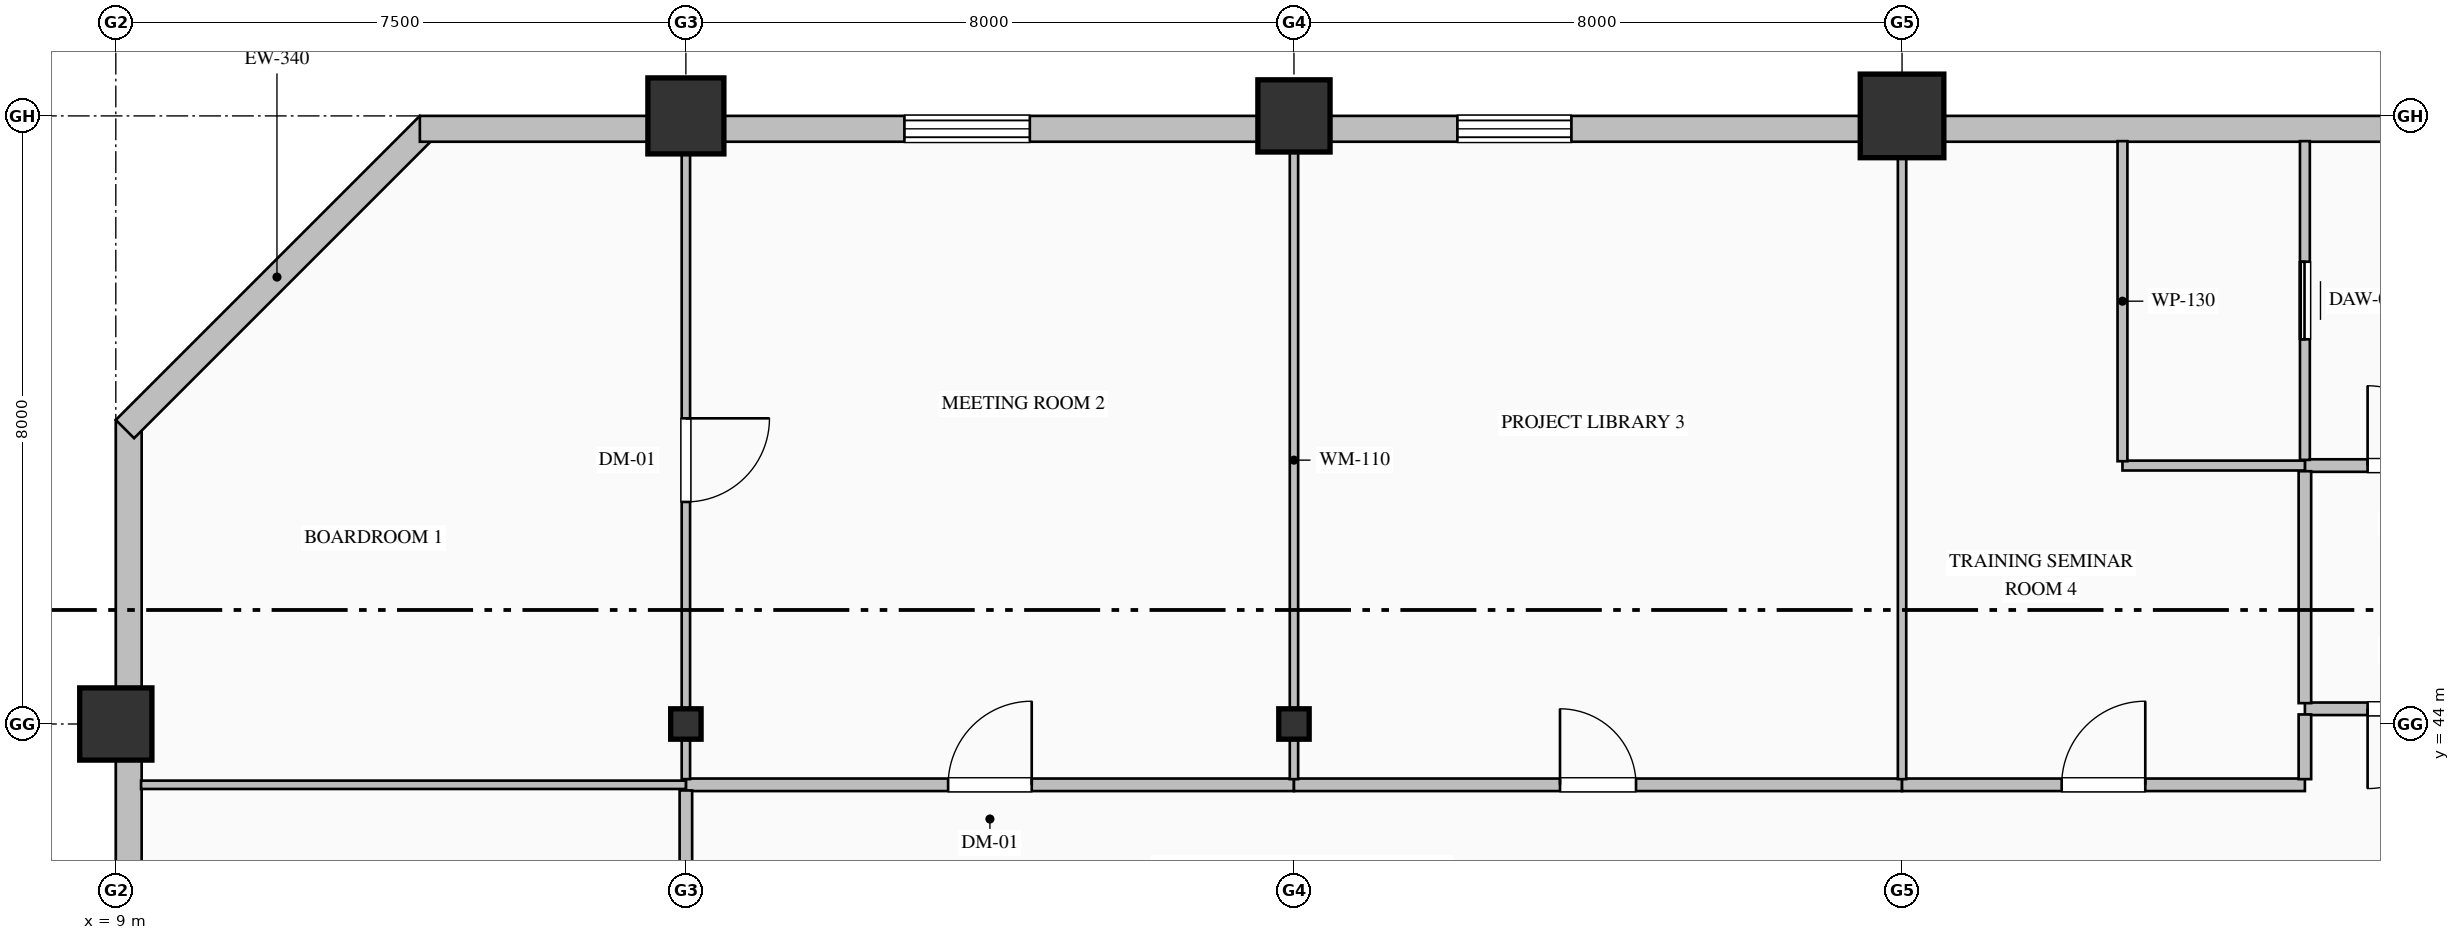
"""IFC4 building model, lengths in metres.
Left out: names, types, materials, properties, quantities, classifications, styles, units other than length and angle.
Written with IfcOpenShell. Run it as: python <this file> out.ifc"""

import sys

from ifc_helpers import new_model, si_unit, direction, frame, frame_2d, origin, origin_2d, place, context, subcontext, project, spatial, rectangle, hollow_rectangle, hollow_circle, i_section, extrude, element, fill, save


model = new_model("IFC4")
c1 = context("Model", 3, precision=1e-05, world=origin(), true_north=direction((0.0, 1.0)))
c2 = subcontext(c1, "Body", "Model", "MODEL_VIEW")
j1 = project(units=[si_unit("LENGTHUNIT", "METRE"), si_unit("PLANEANGLEUNIT", "RADIAN")], contexts=[c1])
p1 = place(None, origin())
s1 = spatial("IfcSite", under=j1, at=p1, CompositionType="ELEMENT")
p2 = place(p1, origin())
s2 = spatial("IfcBuilding", under=s1, at=p2, CompositionType="ELEMENT")
p3 = place(p2, frame((0.0, 0.0, 131.0)))
s3 = spatial("IfcBuildingStorey", under=s2, at=p3, CompositionType="ELEMENT", Elevation=131.0)
p4 = place(p3, frame((9.0, 44.0, 0.0), z_axis=(0.0, 0.0, 1.0), x_axis=(1.0, 0.0, 0.0)))
e1 = element("IfcColumn", 1, at=p4, inside=s3, PredefinedType="COLUMN", context=c2, shape_type="SweptSolid", body=[
    extrude(hollow_rectangle(XDim=0.95, YDim=0.95, WallThickness=0.036, at=origin_2d()), origin(), (0.0, 0.0, 1.0), 4.0),
])
p5 = place(p3, frame((16.5, 44.0, 0.0), z_axis=(0.0, 0.0, 1.0), x_axis=(1.0, 0.0, 0.0)))
e2 = element("IfcColumn", 2, at=p5, inside=s3, PredefinedType="COLUMN", context=c2, shape_type="SweptSolid", body=[
    extrude(i_section(OverallWidth=0.4, OverallDepth=0.4, WebThickness=0.013, FlangeThickness=0.021, FilletRadius=0.022, at=origin_2d()), origin(), (0.0, 0.0, 1.0), 4.0),
])
p6 = place(p3, frame((16.5, 52.0, 0.0), z_axis=(0.0, 0.0, 1.0), x_axis=(1.0, 0.0, 0.0)))
e3 = element("IfcColumn", 3, at=p6, inside=s3, PredefinedType="COLUMN", context=c2, shape_type="SweptSolid", body=[
    extrude(hollow_circle(Radius=0.5, WallThickness=0.036, at=origin_2d()), origin(), (0.0, 0.0, 1.0), 4.0),
])
p7 = place(p3, frame((24.5, 44.0, 0.0), z_axis=(0.0, 0.0, 1.0), x_axis=(1.0, 0.0, 0.0)))
e4 = element("IfcColumn", 4, at=p7, inside=s3, PredefinedType="COLUMN", context=c2, shape_type="SweptSolid", body=[
    extrude(i_section(OverallWidth=0.4, OverallDepth=0.4, WebThickness=0.013, FlangeThickness=0.021, FilletRadius=0.022, at=origin_2d()), origin(), (0.0, 0.0, 1.0), 4.0),
])
p8 = place(p3, frame((24.5, 52.0, 0.0), z_axis=(0.0, 0.0, 1.0), x_axis=(1.0, 0.0, 0.0)))
e5 = element("IfcColumn", 5, at=p8, inside=s3, PredefinedType="COLUMN", context=c2, shape_type="SweptSolid", body=[
    extrude(hollow_rectangle(XDim=0.95, YDim=0.95, WallThickness=0.036, at=origin_2d()), origin(), (0.0, 0.0, 1.0), 4.0),
])
p9 = place(p3, frame((32.5, 52.0, 0.0), z_axis=(0.0, 0.0, 1.0), x_axis=(1.0, 0.0, 0.0)))
e6 = element("IfcColumn", 6, at=p9, inside=s3, PredefinedType="COLUMN", context=c2, shape_type="SweptSolid", body=[
    extrude(hollow_rectangle(XDim=1.1, YDim=1.1, WallThickness=0.04, at=origin_2d()), origin(), (0.0, 0.0, 1.0), 4.0),
])
p10 = place(p3, frame((9.17, 32.0, 0.0), z_axis=(0.0, 0.0, 1.0), x_axis=(0.0, 1.0, 0.0)))
e7 = element("IfcWall", 7, at=p10, inside=s3, PredefinedType="SOLIDWALL", context=c2, shape_type="SweptSolid", body=[
    extrude(rectangle(XDim=16.0, YDim=0.34, at=frame_2d((8.0, 0.0))), origin(), (0.0, 0.0, 1.0), 3.265),
])
p11 = place(p10, frame((6.6, 0.0, 0.7)))
e8 = element("IfcOpeningElement", 8, at=p11, cuts=e7, PredefinedType="OPENING", context=c2, shape_type="SweptSolid", body=[
    extrude(rectangle(XDim=1.2, YDim=1.85, at=frame_2d((0.6, 0.925))), frame((0.0, 0.18, 0.0), z_axis=(0.0, -1.0, 0.0), x_axis=(1.0, 0.0, 0.0)), (0.0, 0.0, 1.0), 0.36),
])
p12 = place(p3, frame((9.12, 47.88, 0.0), z_axis=(0.0, 0.0, 1.0), x_axis=(0.707106781187, 0.707106781187, 0.0)))
e9 = element("IfcWall", 9, at=p12, inside=s3, PredefinedType="SOLIDWALL", context=c2, shape_type="SweptSolid", body=[
    extrude(rectangle(XDim=5.657, YDim=0.34, at=frame_2d((2.828, 0.0))), origin(), (0.0, 0.0, 1.0), 3.765),
])
p13 = place(p3, frame((13.0, 51.83, 0.0), z_axis=(0.0, 0.0, 1.0), x_axis=(1.0, 0.0, 0.0)))
e10 = element("IfcWall", 10, at=p13, inside=s3, PredefinedType="SOLIDWALL", context=c2, shape_type="SweptSolid", body=[
    extrude(rectangle(XDim=27.52, YDim=0.34, at=frame_2d((13.76, 0.0))), origin(), (0.0, 0.0, 1.0), 3.265),
])
p14 = place(p13, frame((6.375, 0.0, 0.85)))
e11 = element("IfcOpeningElement", 11, at=p14, cuts=e10, PredefinedType="OPENING", context=c2, shape_type="SweptSolid", body=[
    extrude(rectangle(XDim=1.65, YDim=1.95, at=frame_2d((0.825, 0.975))), frame((0.0, 0.18, 0.0), z_axis=(0.0, -1.0, 0.0), x_axis=(1.0, 0.0, 0.0)), (0.0, 0.0, 1.0), 0.36),
])
p15 = place(p13, frame((13.65, 0.0, 0.85)))
e12 = element("IfcOpeningElement", 12, at=p15, cuts=e10, PredefinedType="OPENING", context=c2, shape_type="SweptSolid", body=[
    extrude(rectangle(XDim=1.5, YDim=1.95, at=frame_2d((0.75, 0.975))), frame((0.0, 0.18, 0.0), z_axis=(0.0, -1.0, 0.0), x_axis=(1.0, 0.0, 0.0)), (0.0, 0.0, 1.0), 0.36),
])
p16 = place(p3, frame((37.8, 47.4, 0.0), z_axis=(0.0, 0.0, 1.0), x_axis=(1.0, 0.0, 0.0)))
e13 = element("IfcWall", 13, at=p16, inside=s3, PredefinedType="PARTITIONING", context=c2, shape_type="SweptSolid", body=[
    extrude(rectangle(XDim=2.7, YDim=0.165, at=frame_2d((1.35, 0.0))), origin(), (0.0, 0.0, 1.0), 3.765),
])
p17 = place(p16, frame((0.825, 0.0, 0.0)))
e14 = element("IfcOpeningElement", 14, at=p17, cuts=e13, PredefinedType="OPENING", context=c2, shape_type="SweptSolid", body=[
    extrude(rectangle(XDim=1.05, YDim=2.15, at=frame_2d((0.525, 1.075))), frame((0.0, 0.093, 0.0), z_axis=(0.0, -1.0, 0.0), x_axis=(1.0, 0.0, 0.0)), (0.0, 0.0, 1.0), 0.185),
])
p18 = place(p3, frame((40.5, 44.2, 0.0), z_axis=(0.0, 0.0, 1.0), x_axis=(-1.0, 0.0, 0.0)))
e15 = element("IfcWall", 15, at=p18, inside=s3, PredefinedType="PARTITIONING", context=c2, shape_type="SweptSolid", body=[
    extrude(rectangle(XDim=2.7, YDim=0.165, at=frame_2d((1.35, 0.0))), origin(), (0.0, 0.0, 1.0), 3.765),
])
p19 = place(p18, frame((0.825, 0.0, 0.0)))
e16 = element("IfcOpeningElement", 16, at=p19, cuts=e15, PredefinedType="OPENING", context=c2, shape_type="SweptSolid", body=[
    extrude(rectangle(XDim=1.05, YDim=2.15, at=frame_2d((0.525, 1.075))), frame((0.0, 0.093, 0.0), z_axis=(0.0, -1.0, 0.0), x_axis=(1.0, 0.0, 0.0)), (0.0, 0.0, 1.0), 0.185),
])
p20 = place(p3, frame((37.8, 44.274, 0.0), z_axis=(0.0, 0.0, 1.0), x_axis=(0.0, 1.0, 0.0)))
e17 = element("IfcWall", 17, at=p20, inside=s3, PredefinedType="PARTITIONING", context=c2, shape_type="SweptSolid", body=[
    extrude(rectangle(XDim=3.051, YDim=0.165, at=frame_2d((1.525, 0.0))), origin(), (0.0, 0.0, 1.0), 3.765),
])
p21 = place(p3, frame((37.8, 47.475, 0.0), z_axis=(0.0, 0.0, 1.0), x_axis=(0.0, 1.0, 0.0)))
e18 = element("IfcWall", 18, at=p21, inside=s3, PredefinedType="PARTITIONING", context=c2, shape_type="SweptSolid", body=[
    extrude(rectangle(XDim=4.193, YDim=0.13, at=frame_2d((2.097, 0.0))), origin(), (0.0, 0.0, 1.0), 3.765),
])
p22 = place(p21, frame((1.587, 0.0, 0.0)))
e19 = element("IfcOpeningElement", 19, at=p22, cuts=e18, PredefinedType="OPENING", context=c2, shape_type="SweptSolid", body=[
    extrude(rectangle(XDim=1.02, YDim=2.15, at=frame_2d((0.51, 1.075))), frame((0.0, 0.075, 0.0), z_axis=(0.0, -1.0, 0.0), x_axis=(1.0, 0.0, 0.0)), (0.0, 0.0, 1.0), 0.15),
])
p23 = place(p3, frame((37.8, 47.4, 0.0), z_axis=(0.0, 0.0, 1.0), x_axis=(-1.0, 0.0, 0.0)))
e20 = element("IfcWall", 20, at=p23, inside=s3, PredefinedType="PARTITIONING", context=c2, shape_type="SweptSolid", body=[
    extrude(rectangle(XDim=2.4, YDim=0.13, at=frame_2d((1.2, 0.0))), origin(), (0.0, 0.0, 1.0), 3.765),
])
p24 = place(p3, frame((35.4, 47.457, 0.0), z_axis=(0.0, 0.0, 1.0), x_axis=(0.0, 1.0, 0.0)))
e21 = element("IfcWall", 21, at=p24, inside=s3, PredefinedType="PARTITIONING", context=c2, shape_type="SweptSolid", body=[
    extrude(rectangle(XDim=4.211, YDim=0.13, at=frame_2d((2.105, 0.0))), origin(), (0.0, 0.0, 1.0), 3.765),
])
p25 = place(p3, frame((16.5, 43.2, 0.0), z_axis=(0.0, 0.0, 1.0), x_axis=(1.0, 0.0, 0.0)))
e22 = element("IfcWall", 22, at=p25, inside=s3, PredefinedType="PARTITIONING", context=c2, shape_type="SweptSolid", body=[
    extrude(rectangle(XDim=8.0, YDim=0.165, at=frame_2d((4.0, 0.0))), origin(), (0.0, 0.0, 1.0), 3.765),
])
p26 = place(p25, frame((3.45, 0.0, 0.0)))
e23 = element("IfcOpeningElement", 23, at=p26, cuts=e22, PredefinedType="OPENING", context=c2, shape_type="SweptSolid", body=[
    extrude(rectangle(XDim=1.1, YDim=2.2, at=frame_2d((0.55, 1.1))), frame((0.0, 0.093, 0.0), z_axis=(0.0, -1.0, 0.0), x_axis=(1.0, 0.0, 0.0)), (0.0, 0.0, 1.0), 0.185),
])
p27 = place(p3, frame((24.5, 43.2, 0.0), z_axis=(0.0, 0.0, 1.0), x_axis=(1.0, 0.0, 0.0)))
e24 = element("IfcWall", 24, at=p27, inside=s3, PredefinedType="PARTITIONING", context=c2, shape_type="SweptSolid", body=[
    extrude(rectangle(XDim=8.0, YDim=0.165, at=frame_2d((4.0, 0.0))), origin(), (0.0, 0.0, 1.0), 3.765),
])
p28 = place(p27, frame((3.5, 0.0, 0.0)))
e25 = element("IfcOpeningElement", 25, at=p28, cuts=e24, PredefinedType="OPENING", context=c2, shape_type="SweptSolid", body=[
    extrude(rectangle(XDim=1.0, YDim=2.15, at=frame_2d((0.5, 1.075))), frame((0.0, 0.093, 0.0), z_axis=(0.0, -1.0, 0.0), x_axis=(1.0, 0.0, 0.0)), (0.0, 0.0, 1.0), 0.185),
])
p29 = place(p3, frame((32.5, 43.2, 0.0), z_axis=(0.0, 0.0, 1.0), x_axis=(1.0, 0.0, 0.0)))
e26 = element("IfcWall", 26, at=p29, inside=s3, PredefinedType="PARTITIONING", context=c2, shape_type="SweptSolid", body=[
    extrude(rectangle(XDim=5.3, YDim=0.165, at=frame_2d((2.65, 0.0))), origin(), (0.0, 0.0, 1.0), 3.765),
])
p30 = place(p29, frame((2.1, 0.0, 0.0)))
e27 = element("IfcOpeningElement", 27, at=p30, cuts=e26, PredefinedType="OPENING", context=c2, shape_type="SweptSolid", body=[
    extrude(rectangle(XDim=1.1, YDim=2.2, at=frame_2d((0.55, 1.1))), frame((0.0, 0.093, 0.0), z_axis=(0.0, -1.0, 0.0), x_axis=(1.0, 0.0, 0.0)), (0.0, 0.0, 1.0), 0.185),
])
p31 = place(p3, frame((16.5, 41.0, 0.0), z_axis=(0.0, 0.0, 1.0), x_axis=(0.0, 1.0, 0.0)))
e28 = element("IfcWall", 28, at=p31, inside=s3, PredefinedType="PARTITIONING", context=c2, shape_type="SweptSolid", body=[
    extrude(rectangle(XDim=2.125, YDim=0.165, at=frame_2d((1.063, 0.0))), origin(), (0.0, 0.0, 1.0), 3.157),
])
p32 = place(p3, frame((37.8, 43.274, 0.0), z_axis=(0.0, 0.0, 1.0), x_axis=(0.0, 1.0, 0.0)))
e29 = element("IfcWall", 29, at=p32, inside=s3, PredefinedType="PARTITIONING", context=c2, shape_type="SweptSolid", body=[
    extrude(rectangle(XDim=0.851, YDim=0.165, at=frame_2d((0.426, 0.0))), origin(), (0.0, 0.0, 1.0), 3.765),
])
p33 = place(p3, frame((16.5, 51.668, 0.0), z_axis=(0.0, 0.0, 1.0), x_axis=(0.0, -1.0, 0.0)))
e30 = element("IfcWall", 30, at=p33, inside=s3, PredefinedType="MOVABLE", context=c2, shape_type="SweptSolid", body=[
    extrude(rectangle(XDim=8.394, YDim=0.11, at=frame_2d((4.197, 0.0))), origin(), (0.0, 0.0, 1.0), 3.157),
])
p34 = place(p33, frame((3.647, 0.0, 0.0)))
e31 = element("IfcOpeningElement", 31, at=p34, cuts=e30, PredefinedType="OPENING", context=c2, shape_type="SweptSolid", body=[
    extrude(rectangle(XDim=1.1, YDim=2.2, at=frame_2d((0.55, 1.1))), frame((0.0, 0.065, 0.0), z_axis=(0.0, -1.0, 0.0), x_axis=(1.0, 0.0, 0.0)), (0.0, 0.0, 1.0), 0.13),
])
p35 = place(p3, frame((16.5, 43.2, 0.0), z_axis=(0.0, 0.0, 1.0), x_axis=(-1.0, 0.0, 0.0)))
e32 = element("IfcWall", 32, at=p35, inside=s3, PredefinedType="MOVABLE", context=c2, shape_type="SweptSolid", body=[
    extrude(rectangle(XDim=7.168, YDim=0.11, at=frame_2d((3.584, 0.0))), origin(), (0.0, 0.0, 1.0), 3.765),
])
p36 = place(p3, frame((24.5, 51.668, 0.0), z_axis=(0.0, 0.0, 1.0), x_axis=(0.0, -1.0, 0.0)))
e33 = element("IfcWall", 33, at=p36, inside=s3, PredefinedType="MOVABLE", context=c2, shape_type="SweptSolid", body=[
    extrude(rectangle(XDim=8.394, YDim=0.11, at=frame_2d((4.197, 0.0))), origin(), (0.0, 0.0, 1.0), 3.157),
])
p37 = place(p3, frame((32.5, 51.668, 0.0), z_axis=(0.0, 0.0, 1.0), x_axis=(0.0, -1.0, 0.0)))
e34 = element("IfcWall", 34, at=p37, inside=s3, PredefinedType="MOVABLE", context=c2, shape_type="SweptSolid", body=[
    extrude(rectangle(XDim=8.394, YDim=0.11, at=frame_2d((4.197, 0.0))), origin(), (0.0, 0.0, 1.0), 3.765),
])
p38 = place(p14, origin())
e35 = element("IfcWindow", 35, at=p38, inside=s3, PartitioningType="DOUBLE_PANEL_VERTICAL", PredefinedType="WINDOW", context=c2, shape_type="SweptSolid", body=[
    extrude(rectangle(XDim=1.65, YDim=1.95, at=frame_2d((0.825, 0.975))), frame((0.0, 0.15, 0.0), z_axis=(0.0, -1.0, 0.0), x_axis=(1.0, 0.0, 0.0)), (0.0, 0.0, 1.0), 0.06),
])
fill(e11, e35)
p39 = place(p15, origin())
e36 = element("IfcWindow", 36, at=p39, inside=s3, PartitioningType="DOUBLE_PANEL_VERTICAL", PredefinedType="WINDOW", context=c2, shape_type="SweptSolid", body=[
    extrude(rectangle(XDim=1.5, YDim=1.95, at=frame_2d((0.75, 0.975))), frame((0.0, 0.15, 0.0), z_axis=(0.0, -1.0, 0.0), x_axis=(1.0, 0.0, 0.0)), (0.0, 0.0, 1.0), 0.06),
])
fill(e12, e36)
p40 = place(p17, origin())
e37 = element("IfcDoor", 37, at=p40, inside=s3, OperationType="SINGLE_SWING_LEFT", PredefinedType="DOOR", context=c2, shape_type="SweptSolid", body=[
    extrude(rectangle(XDim=1.05, YDim=2.15, at=frame_2d((0.525, 1.075))), frame((0.0, 0.025, 0.0), z_axis=(0.0, -1.0, 0.0), x_axis=(1.0, 0.0, 0.0)), (0.0, 0.0, 1.0), 0.05),
])
fill(e14, e37)
p41 = place(p19, origin())
e38 = element("IfcDoor", 38, at=p41, inside=s3, OperationType="SINGLE_SWING_RIGHT", PredefinedType="DOOR", context=c2, shape_type="SweptSolid", body=[
    extrude(rectangle(XDim=1.05, YDim=2.15, at=frame_2d((0.525, 1.075))), frame((0.0, 0.025, 0.0), z_axis=(0.0, -1.0, 0.0), x_axis=(1.0, 0.0, 0.0)), (0.0, 0.0, 1.0), 0.05),
])
fill(e16, e38)
p42 = place(p22, origin())
e39 = element("IfcDoor", 39, at=p42, inside=s3, OperationType="SLIDING_TO_LEFT", PredefinedType="DOOR", context=c2, shape_type="SweptSolid", body=[
    extrude(rectangle(XDim=1.02, YDim=2.15, at=frame_2d((0.51, 1.075))), frame((0.0, 0.025, 0.0), z_axis=(0.0, -1.0, 0.0), x_axis=(1.0, 0.0, 0.0)), (0.0, 0.0, 1.0), 0.05),
])
fill(e19, e39)
p43 = place(p34, origin())
e40 = element("IfcDoor", 40, at=p43, inside=s3, OperationType="SINGLE_SWING_LEFT", PredefinedType="DOOR", context=c2, shape_type="SweptSolid", body=[
    extrude(rectangle(XDim=1.1, YDim=2.2, at=frame_2d((0.55, 1.1))), frame((0.0, 0.025, 0.0), z_axis=(0.0, -1.0, 0.0), x_axis=(1.0, 0.0, 0.0)), (0.0, 0.0, 1.0), 0.05),
])
fill(e31, e40)
p44 = place(p26, origin())
e41 = element("IfcDoor", 41, at=p44, inside=s3, OperationType="SINGLE_SWING_RIGHT", PredefinedType="DOOR", context=c2, shape_type="SweptSolid", body=[
    extrude(rectangle(XDim=1.1, YDim=2.2, at=frame_2d((0.55, 1.1))), frame((0.0, 0.025, 0.0), z_axis=(0.0, -1.0, 0.0), x_axis=(1.0, 0.0, 0.0)), (0.0, 0.0, 1.0), 0.05),
])
fill(e23, e41)
p45 = place(p28, origin())
e42 = element("IfcDoor", 42, at=p45, inside=s3, OperationType="SINGLE_SWING_LEFT", PredefinedType="DOOR", context=c2, shape_type="SweptSolid", body=[
    extrude(rectangle(XDim=1.0, YDim=2.15, at=frame_2d((0.5, 1.075))), frame((0.0, 0.025, 0.0), z_axis=(0.0, -1.0, 0.0), x_axis=(1.0, 0.0, 0.0)), (0.0, 0.0, 1.0), 0.05),
])
fill(e25, e42)
p46 = place(p30, origin())
e43 = element("IfcDoor", 43, at=p46, inside=s3, OperationType="SINGLE_SWING_RIGHT", PredefinedType="DOOR", context=c2, shape_type="SweptSolid", body=[
    extrude(rectangle(XDim=1.1, YDim=2.2, at=frame_2d((0.55, 1.1))), frame((0.0, 0.025, 0.0), z_axis=(0.0, -1.0, 0.0), x_axis=(1.0, 0.0, 0.0)), (0.0, 0.0, 1.0), 0.05),
])
fill(e27, e43)
save(model, sys.argv[1])
